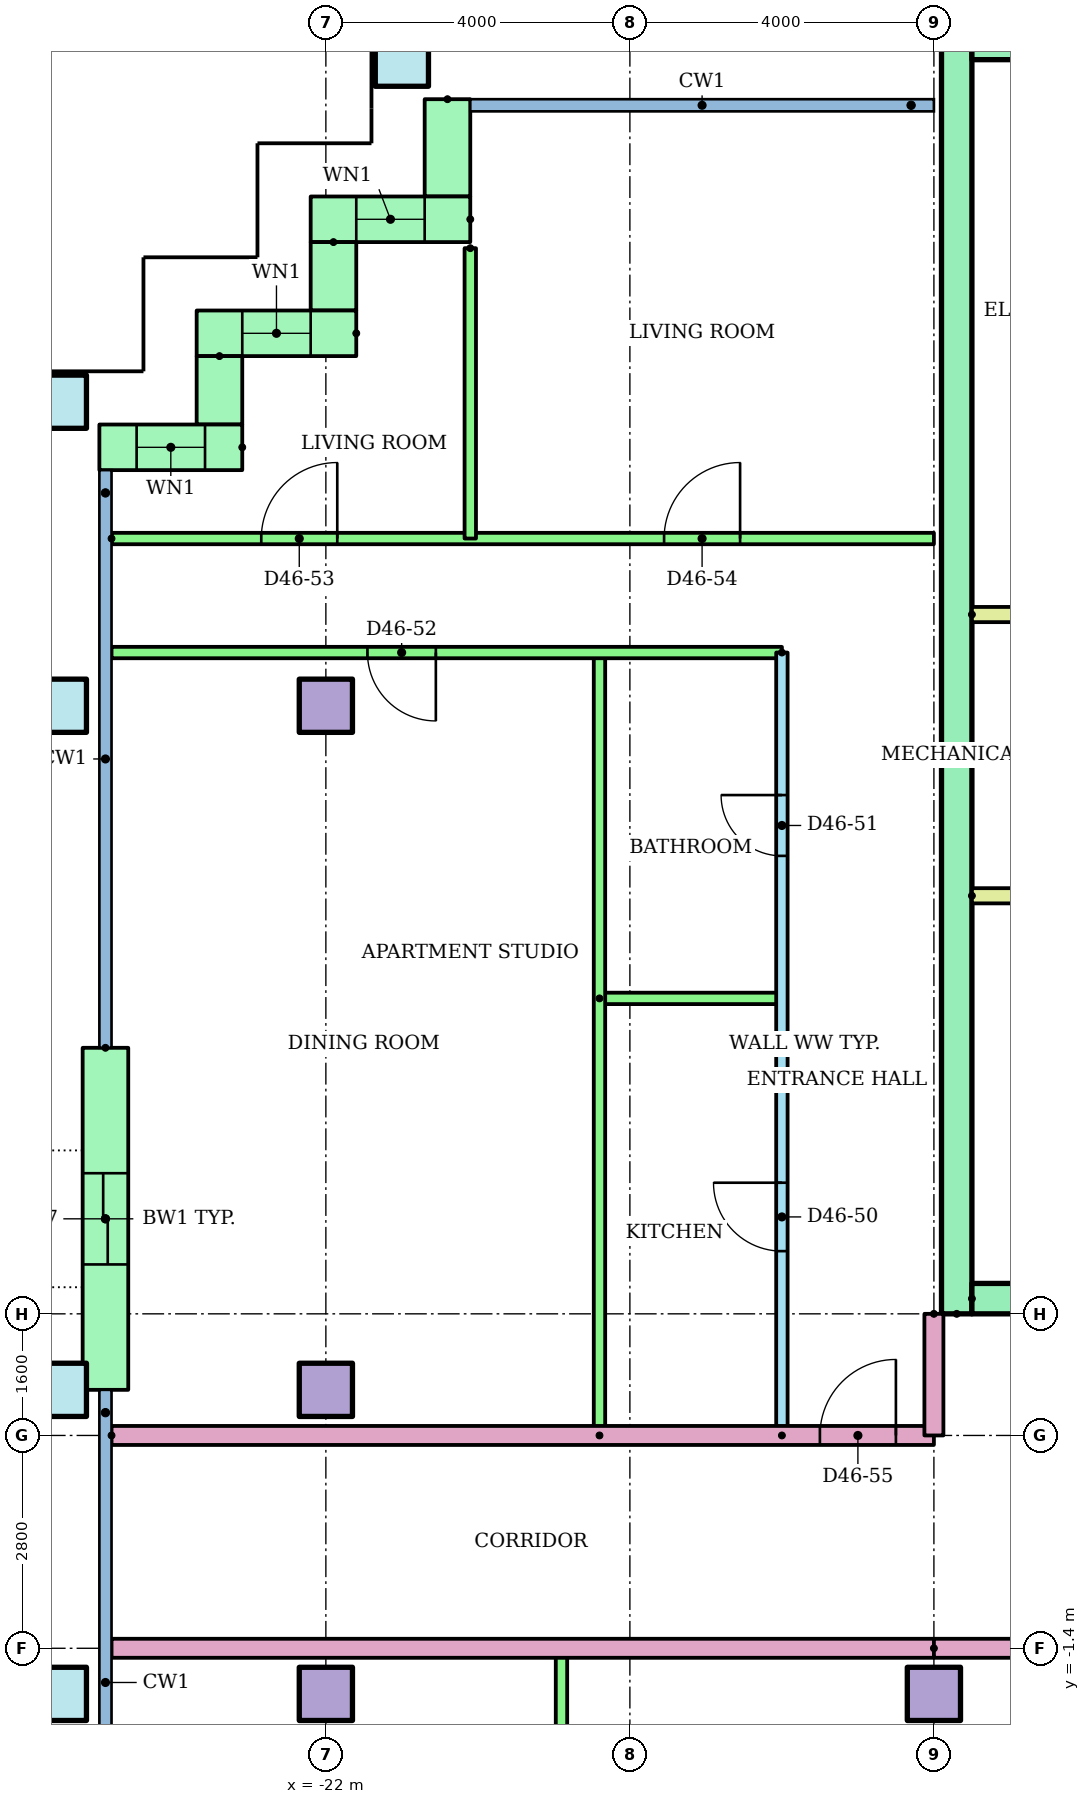
"""IFC4 building model, lengths in metres.
Left out: names, types, materials, properties, quantities, classifications, styles, units other than length and angle.
Written with IfcOpenShell. Run it as: python <this file> out.ifc"""

import sys

from ifc_helpers import new_model, si_unit, direction, frame, frame_2d, origin, origin_2d, place, context, subcontext, project, spatial, rectangle, hollow_rectangle, extrude, element, fill, save


model = new_model("IFC4")
c1 = context("Model", 3, precision=1e-05, world=origin(), true_north=direction((0.0, 1.0)))
c2 = subcontext(c1, "Body", "Model", "MODEL_VIEW")
j1 = project(units=[si_unit("LENGTHUNIT", "METRE"), si_unit("PLANEANGLEUNIT", "RADIAN")], contexts=[c1])
p1 = place(None, origin())
s1 = spatial("IfcSite", under=j1, at=p1, CompositionType="ELEMENT")
p2 = place(p1, origin())
s2 = spatial("IfcBuilding", under=s1, at=p2, CompositionType="ELEMENT")
p3 = place(p2, frame((0.0, 0.0, 178.1)))
s3 = spatial("IfcBuildingStorey", under=s2, at=p3, CompositionType="ELEMENT", Elevation=178.1)
p4 = place(p3, frame((-25.5, -2.0, 0.0)))
e1 = element("IfcColumn", 1, at=p4, inside=s3, PredefinedType="COLUMN", context=c2, shape_type="SweptSolid", body=[
    extrude(hollow_rectangle(XDim=0.7, YDim=0.7, WallThickness=0.036, at=origin_2d()), origin(), (0.0, 0.0, 1.0), 3.2),
])
for number, where in (
    (2, (-22.0, -2.0, 0.0)),
    (3, (-14.0, -2.0, 0.0)),
):
    element("IfcColumn", number, at=place(p3, frame(where)), inside=s3, PredefinedType="COLUMN", context=c2, shape_type="SweptSolid", body=[
        extrude(rectangle(XDim=0.7, YDim=0.7, at=origin_2d()), origin(), (0.0, 0.0, 1.0), 3.2),
    ])
p5 = place(p3, frame((-25.5, 2.0, 0.0)))
e4 = element("IfcColumn", 4, at=p5, inside=s3, PredefinedType="COLUMN", context=c2, shape_type="SweptSolid", body=[
    extrude(hollow_rectangle(XDim=0.7, YDim=0.7, WallThickness=0.036, at=origin_2d()), origin(), (0.0, 0.0, 1.0), 3.2),
])
p6 = place(p3, frame((-22.0, 2.0, 0.0)))
e5 = element("IfcColumn", 5, at=p6, inside=s3, PredefinedType="COLUMN", context=c2, shape_type="SweptSolid", body=[
    extrude(rectangle(XDim=0.7, YDim=0.7, at=origin_2d()), origin(), (0.0, 0.0, 1.0), 3.2),
])
p7 = place(p3, frame((-25.5, 11.0, 0.0)))
e6 = element("IfcColumn", 6, at=p7, inside=s3, PredefinedType="COLUMN", context=c2, shape_type="SweptSolid", body=[
    extrude(hollow_rectangle(XDim=0.7, YDim=0.7, WallThickness=0.036, at=origin_2d()), origin(), (0.0, 0.0, 1.0), 3.2),
])
p8 = place(p3, frame((-22.0, 11.0, 0.0)))
e7 = element("IfcColumn", 7, at=p8, inside=s3, PredefinedType="COLUMN", context=c2, shape_type="SweptSolid", body=[
    extrude(rectangle(XDim=0.7, YDim=0.7, at=origin_2d()), origin(), (0.0, 0.0, 1.0), 3.2),
])
for number, where in (
    (8, (-25.5, 15.0, 0.0)),
    (9, (-21.0, 19.5, 0.0)),
):
    element("IfcColumn", number, at=place(p3, frame(where)), inside=s3, PredefinedType="COLUMN", context=c2, shape_type="SweptSolid", body=[
        extrude(hollow_rectangle(XDim=0.7, YDim=0.7, WallThickness=0.036, at=origin_2d()), origin(), (0.0, 0.0, 1.0), 3.2),
    ])
p9 = place(p3, frame((-20.4, 18.98, 0.0), z_axis=(0.0, 0.0, 1.0), x_axis=(0.0, -1.0, 0.0)))
e10 = element("IfcWall", 10, at=p9, inside=s3, PredefinedType="STANDARD", context=c2, shape_type="SweptSolid", body=[
    extrude(rectangle(XDim=1.28, YDim=0.6, at=frame_2d((0.64, 0.0))), origin(), (0.0, 0.0, 1.0), 2.92),
])
p10 = place(p3, frame((-20.1, 17.4, 0.0), z_axis=(0.0, 0.0, 1.0), x_axis=(-1.0, 0.0, 0.0)))
e11 = element("IfcWall", 11, at=p10, inside=s3, PredefinedType="STANDARD", context=c2, shape_type="SweptSolid", body=[
    extrude(rectangle(XDim=2.1, YDim=0.6, at=frame_2d((1.05, 0.0))), origin(), (0.0, 0.0, 1.0), 2.92),
])
p11 = place(p10, frame((0.6, 0.0, 0.9)))
e12 = element("IfcOpeningElement", 12, at=p11, cuts=e11, PredefinedType="OPENING", context=c2, shape_type="SweptSolid", body=[
    extrude(rectangle(XDim=0.9, YDim=1.5, at=frame_2d((0.45, 0.75))), frame((0.0, 0.31, 0.0), z_axis=(0.0, -1.0, 0.0), x_axis=(1.0, 0.0, 0.0)), (0.0, 0.0, 1.0), 0.62),
])
p12 = place(p3, frame((-21.9, 17.1, 0.0), z_axis=(0.0, 0.0, 1.0), x_axis=(0.0, -1.0, 0.0)))
e13 = element("IfcWall", 13, at=p12, inside=s3, PredefinedType="STANDARD", context=c2, shape_type="SweptSolid", body=[
    extrude(rectangle(XDim=0.9, YDim=0.6, at=frame_2d((0.45, 0.0))), origin(), (0.0, 0.0, 1.0), 2.92),
])
p13 = place(p3, frame((-21.6, 15.9, 0.0), z_axis=(0.0, 0.0, 1.0), x_axis=(-1.0, 0.0, 0.0)))
e14 = element("IfcWall", 14, at=p13, inside=s3, PredefinedType="STANDARD", context=c2, shape_type="SweptSolid", body=[
    extrude(rectangle(XDim=2.1, YDim=0.6, at=frame_2d((1.05, 0.0))), origin(), (0.0, 0.0, 1.0), 2.92),
])
p14 = place(p13, frame((0.6, 0.0, 0.9)))
e15 = element("IfcOpeningElement", 15, at=p14, cuts=e14, PredefinedType="OPENING", context=c2, shape_type="SweptSolid", body=[
    extrude(rectangle(XDim=0.9, YDim=1.5, at=frame_2d((0.45, 0.75))), frame((0.0, 0.31, 0.0), z_axis=(0.0, -1.0, 0.0), x_axis=(1.0, 0.0, 0.0)), (0.0, 0.0, 1.0), 0.62),
])
p15 = place(p3, frame((-23.4, 15.6, 0.0), z_axis=(0.0, 0.0, 1.0), x_axis=(0.0, -1.0, 0.0)))
e16 = element("IfcWall", 16, at=p15, inside=s3, PredefinedType="STANDARD", context=c2, shape_type="SweptSolid", body=[
    extrude(rectangle(XDim=0.9, YDim=0.6, at=frame_2d((0.45, 0.0))), origin(), (0.0, 0.0, 1.0), 2.92),
])
p16 = place(p3, frame((-23.1, 14.4, 0.0), z_axis=(0.0, 0.0, 1.0), x_axis=(-1.0, 0.0, 0.0)))
e17 = element("IfcWall", 17, at=p16, inside=s3, PredefinedType="STANDARD", context=c2, shape_type="SweptSolid", body=[
    extrude(rectangle(XDim=1.88, YDim=0.6, at=frame_2d((0.94, 0.0))), origin(), (0.0, 0.0, 1.0), 2.92),
])
p17 = place(p16, frame((0.49, 0.0, 0.9)))
e18 = element("IfcOpeningElement", 18, at=p17, cuts=e17, PredefinedType="OPENING", context=c2, shape_type="SweptSolid", body=[
    extrude(rectangle(XDim=0.9, YDim=1.5, at=frame_2d((0.45, 0.75))), frame((0.0, 0.31, 0.0), z_axis=(0.0, -1.0, 0.0), x_axis=(1.0, 0.0, 0.0)), (0.0, 0.0, 1.0), 0.62),
])
p18 = place(p3, frame((-24.9, 6.5, 0.0), z_axis=(0.0, 0.0, 1.0), x_axis=(0.0, -1.0, 0.0)))
e19 = element("IfcWall", 19, at=p18, inside=s3, PredefinedType="STANDARD", context=c2, shape_type="SweptSolid", body=[
    extrude(rectangle(XDim=4.5, YDim=0.6, at=frame_2d((2.25, 0.0))), origin(), (0.0, 0.0, 1.0), 2.92),
])
p19 = place(p18, frame((1.65, 0.0, 0.0)))
e20 = element("IfcOpeningElement", 20, at=p19, cuts=e19, PredefinedType="OPENING", context=c2, shape_type="SweptSolid", body=[
    extrude(rectangle(XDim=1.2, YDim=2.1, at=frame_2d((0.6, 1.05))), frame((0.0, 0.31, 0.0), z_axis=(0.0, -1.0, 0.0), x_axis=(1.0, 0.0, 0.0)), (0.0, 0.0, 1.0), 0.62),
])
p20 = place(p3, frame((-13.7, 3.0, 0.0), z_axis=(0.0, 0.0, 1.0), x_axis=(0.0, 1.0, 0.0)))
e21 = element("IfcWall", 21, at=p20, inside=s3, PredefinedType="SHEAR", context=c2, shape_type="SweptSolid", body=[
    extrude(rectangle(XDim=17.0, YDim=0.4, at=frame_2d((8.5, 0.0))), origin(), (0.0, 0.0, 1.0), 2.92),
])
p21 = place(p3, frame((-13.5, 19.7, 0.0)))
e22 = element("IfcWall", 22, at=p21, inside=s3, PredefinedType="SHEAR", context=c2, shape_type="SweptSolid", body=[
    extrude(rectangle(XDim=27.0, YDim=0.4, at=frame_2d((13.5, 0.0))), origin(), (0.0, 0.0, 1.0), 2.92),
])
p22 = place(p3, frame((-13.5, 3.2, 0.0)))
e23 = element("IfcWall", 23, at=p22, inside=s3, PredefinedType="SHEAR", context=c2, shape_type="SweptSolid", body=[
    extrude(rectangle(XDim=27.0, YDim=0.4, at=frame_2d((13.5, 0.0))), origin(), (0.0, 0.0, 1.0), 2.92),
])
p23 = place(p22, frame((22.083, 0.0, 0.0)))
e24 = element("IfcOpeningElement", 24, at=p23, cuts=e23, PredefinedType="OPENING", context=c2, shape_type="SweptSolid", body=[
    extrude(rectangle(XDim=1.1, YDim=2.1, at=frame_2d((0.55, 1.05))), frame((0.0, 0.21, 0.0), z_axis=(0.0, -1.0, 0.0), x_axis=(1.0, 0.0, 0.0)), (0.0, 0.0, 1.0), 0.42),
])
p24 = place(p22, frame((25.128, 0.0, 0.0)))
e25 = element("IfcOpeningElement", 25, at=p24, cuts=e23, PredefinedType="OPENING", context=c2, shape_type="SweptSolid", body=[
    extrude(rectangle(XDim=1.1, YDim=2.1, at=frame_2d((0.55, 1.05))), frame((0.0, 0.21, 0.0), z_axis=(0.0, -1.0, 0.0), x_axis=(1.0, 0.0, 0.0)), (0.0, 0.0, 1.0), 0.42),
])
p25 = place(p22, frame((12.6, 0.0, 0.0)))
e26 = element("IfcOpeningElement", 26, at=p25, cuts=e23, PredefinedType="OPENING", context=c2, shape_type="SweptSolid", body=[
    extrude(rectangle(XDim=1.8, YDim=2.1, at=frame_2d((0.9, 1.05))), frame((0.0, 0.21, 0.0), z_axis=(0.0, -1.0, 0.0), x_axis=(1.0, 0.0, 0.0)), (0.0, 0.0, 1.0), 0.42),
])
for number, where in (
    (27, (-13.5, 8.5, 0.0)),
    (28, (-13.5, 12.2, 0.0)),
):
    element("IfcWall", number, at=place(p3, frame(where)), inside=s3, PredefinedType="PARTITIONING", context=c2, shape_type="SweptSolid", body=[
        extrude(rectangle(XDim=3.9, YDim=0.2, at=frame_2d((1.95, 0.0))), origin(), (0.0, 0.0, 1.0), 2.92),
    ])
p26 = place(p3, frame((-18.9, -9.3, 0.0), z_axis=(0.0, 0.0, 1.0), x_axis=(0.0, 1.0, 0.0)))
e29 = element("IfcWall", 29, at=p26, inside=s3, PredefinedType="PARTITIONING", context=c2, shape_type="SweptSolid", body=[
    extrude(rectangle(XDim=7.9, YDim=0.15, at=frame_2d((3.95, 0.0))), origin(), (0.0, 0.0, 1.0), 2.4),
])
p27 = place(p3, frame((-14.0, -1.4, 0.0), z_axis=(0.0, 0.0, 1.0), x_axis=(-1.0, 0.0, 0.0)))
e30 = element("IfcWall", 30, at=p27, inside=s3, PredefinedType="PARTITIONING", context=c2, shape_type="SweptSolid", body=[
    extrude(rectangle(XDim=10.82, YDim=0.25, at=frame_2d((5.41, 0.0))), origin(), (0.0, 0.0, 1.0), 2.4),
])
p28 = place(p3, frame((-16.0, 1.4, 0.0), z_axis=(0.0, 0.0, 1.0), x_axis=(0.0, 1.0, 0.0)))
e31 = element("IfcWall", 31, at=p28, inside=s3, PredefinedType="PARTITIONING", context=c2, shape_type="SweptSolid", body=[
    extrude(rectangle(XDim=10.3, YDim=0.15, at=frame_2d((5.15, 0.0))), origin(), (0.0, 0.0, 1.0), 2.4),
])
p29 = place(p28, frame((2.425, 0.0, 0.0)))
e32 = element("IfcOpeningElement", 32, at=p29, cuts=e31, PredefinedType="OPENING", context=c2, shape_type="SweptSolid", body=[
    extrude(rectangle(XDim=0.9, YDim=2.1, at=frame_2d((0.45, 1.05))), frame((0.0, 0.085, 0.0), z_axis=(0.0, -1.0, 0.0), x_axis=(1.0, 0.0, 0.0)), (0.0, 0.0, 1.0), 0.17),
])
p30 = place(p28, frame((7.625, 0.0, 0.0)))
e33 = element("IfcOpeningElement", 33, at=p30, cuts=e31, PredefinedType="OPENING", context=c2, shape_type="SweptSolid", body=[
    extrude(rectangle(XDim=0.8, YDim=2.1, at=frame_2d((0.4, 1.05))), frame((0.0, 0.085, 0.0), z_axis=(0.0, -1.0, 0.0), x_axis=(1.0, 0.0, 0.0)), (0.0, 0.0, 1.0), 0.17),
])
p31 = place(p3, frame((-18.4, 7.15, 0.0)))
e34 = element("IfcWall", 34, at=p31, inside=s3, PredefinedType="PARTITIONING", context=c2, shape_type="SweptSolid", body=[
    extrude(rectangle(XDim=2.4, YDim=0.15, at=frame_2d((1.2, 0.0))), origin(), (0.0, 0.0, 1.0), 2.4),
])
p32 = place(p3, frame((-18.4, 1.4, 0.0), z_axis=(0.0, 0.0, 1.0), x_axis=(0.0, 1.0, 0.0)))
e35 = element("IfcWall", 35, at=p32, inside=s3, PredefinedType="PARTITIONING", context=c2, shape_type="SweptSolid", body=[
    extrude(rectangle(XDim=10.3, YDim=0.15, at=frame_2d((5.15, 0.0))), origin(), (0.0, 0.0, 1.0), 2.4),
])
p33 = place(p3, frame((-16.0, 11.7, 0.0), z_axis=(0.0, 0.0, 1.0), x_axis=(-1.0, 0.0, 0.0)))
e36 = element("IfcWall", 36, at=p33, inside=s3, PredefinedType="PARTITIONING", context=c2, shape_type="SweptSolid", body=[
    extrude(rectangle(XDim=8.82, YDim=0.15, at=frame_2d((4.41, 0.0))), origin(), (0.0, 0.0, 1.0), 2.4),
])
p34 = place(p33, frame((4.553, 0.0, 0.0)))
e37 = element("IfcOpeningElement", 37, at=p34, cuts=e36, PredefinedType="OPENING", context=c2, shape_type="SweptSolid", body=[
    extrude(rectangle(XDim=0.9, YDim=2.1, at=frame_2d((0.45, 1.05))), frame((0.0, 0.085, 0.0), z_axis=(0.0, -1.0, 0.0), x_axis=(1.0, 0.0, 0.0)), (0.0, 0.0, 1.0), 0.17),
])
p35 = place(p3, frame((-24.82, 13.2, 0.0)))
e38 = element("IfcWall", 38, at=p35, inside=s3, PredefinedType="PARTITIONING", context=c2, shape_type="SweptSolid", body=[
    extrude(rectangle(XDim=10.82, YDim=0.15, at=frame_2d((5.41, 0.0))), origin(), (0.0, 0.0, 1.0), 2.4),
])
p36 = place(p35, frame((1.97, 0.0, 0.0)))
e39 = element("IfcOpeningElement", 39, at=p36, cuts=e38, PredefinedType="OPENING", context=c2, shape_type="SweptSolid", body=[
    extrude(rectangle(XDim=1.0, YDim=2.1, at=frame_2d((0.5, 1.05))), frame((0.0, 0.085, 0.0), z_axis=(0.0, -1.0, 0.0), x_axis=(1.0, 0.0, 0.0)), (0.0, 0.0, 1.0), 0.17),
])
p37 = place(p35, frame((7.27, 0.0, 0.0)))
e40 = element("IfcOpeningElement", 40, at=p37, cuts=e38, PredefinedType="OPENING", context=c2, shape_type="SweptSolid", body=[
    extrude(rectangle(XDim=1.0, YDim=2.1, at=frame_2d((0.5, 1.05))), frame((0.0, 0.085, 0.0), z_axis=(0.0, -1.0, 0.0), x_axis=(1.0, 0.0, 0.0)), (0.0, 0.0, 1.0), 0.17),
])
p38 = place(p3, frame((-20.1, 17.02, 0.0), z_axis=(0.0, 0.0, 1.0), x_axis=(0.0, -1.0, 0.0)))
e41 = element("IfcWall", 41, at=p38, inside=s3, PredefinedType="PARTITIONING", context=c2, shape_type="SweptSolid", body=[
    extrude(rectangle(XDim=3.82, YDim=0.15, at=frame_2d((1.91, 0.0))), origin(), (0.0, 0.0, 1.0), 2.4),
])
p39 = place(p3, frame((-24.82, 1.4, 0.0)))
e42 = element("IfcWall", 42, at=p39, inside=s3, PredefinedType="PARTITIONING", context=c2, shape_type="SweptSolid", body=[
    extrude(rectangle(XDim=10.82, YDim=0.25, at=frame_2d((5.41, 0.0))), origin(), (0.0, 0.0, 1.0), 2.4),
])
p40 = place(p39, frame((9.32, 0.0, 0.0)))
e43 = element("IfcOpeningElement", 43, at=p40, cuts=e42, PredefinedType="OPENING", context=c2, shape_type="SweptSolid", body=[
    extrude(rectangle(XDim=1.0, YDim=2.1, at=frame_2d((0.5, 1.05))), frame((0.0, 0.135, 0.0), z_axis=(0.0, -1.0, 0.0), x_axis=(1.0, 0.0, 0.0)), (0.0, 0.0, 1.0), 0.27),
])
p41 = place(p3, frame((14.0, -1.4, 0.0), z_axis=(0.0, 0.0, 1.0), x_axis=(-1.0, 0.0, 0.0)))
e44 = element("IfcWall", 44, at=p41, inside=s3, PredefinedType="PARTITIONING", context=c2, shape_type="SweptSolid", body=[
    extrude(rectangle(XDim=28.0, YDim=0.25, at=frame_2d((14.0, 0.0))), origin(), (0.0, 0.0, 1.0), 2.4),
])
p42 = place(p41, frame((12.547, 0.0, 0.0)))
e45 = element("IfcOpeningElement", 45, at=p42, cuts=e44, PredefinedType="OPENING", context=c2, shape_type="SweptSolid", body=[
    extrude(rectangle(XDim=1.0, YDim=2.1, at=frame_2d((0.5, 1.05))), frame((0.0, 0.135, 0.0), z_axis=(0.0, -1.0, 0.0), x_axis=(1.0, 0.0, 0.0)), (0.0, 0.0, 1.0), 0.27),
])
p43 = place(p41, frame((10.453, 0.0, 0.0)))
e46 = element("IfcOpeningElement", 46, at=p43, cuts=e44, PredefinedType="OPENING", context=c2, shape_type="SweptSolid", body=[
    extrude(rectangle(XDim=1.0, YDim=2.1, at=frame_2d((0.5, 1.05))), frame((0.0, 0.135, 0.0), z_axis=(0.0, -1.0, 0.0), x_axis=(1.0, 0.0, 0.0)), (0.0, 0.0, 1.0), 0.27),
])
p44 = place(p3, frame((-14.0, 3.0, 0.0), z_axis=(0.0, 0.0, 1.0), x_axis=(0.0, -1.0, 0.0)))
e47 = element("IfcWall", 47, at=p44, inside=s3, PredefinedType="PARTITIONING", context=c2, shape_type="SweptSolid", body=[
    extrude(rectangle(XDim=1.6, YDim=0.25, at=frame_2d((0.8, 0.0))), origin(), (0.0, 0.0, 1.0), 2.4),
])
p45 = place(p11, origin())
e48 = element("IfcWindow", 48, at=p45, inside=s3, PartitioningType="SINGLE_PANEL", PredefinedType="WINDOW", context=c2, shape_type="SweptSolid", body=[
    extrude(rectangle(XDim=0.9, YDim=1.5, at=frame_2d((0.45, 0.75))), frame((0.0, 0.03, 0.0), z_axis=(0.0, -1.0, 0.0), x_axis=(1.0, 0.0, 0.0)), (0.0, 0.0, 1.0), 0.06),
])
fill(e12, e48)
p46 = place(p14, origin())
e49 = element("IfcWindow", 49, at=p46, inside=s3, PartitioningType="SINGLE_PANEL", PredefinedType="WINDOW", context=c2, shape_type="SweptSolid", body=[
    extrude(rectangle(XDim=0.9, YDim=1.5, at=frame_2d((0.45, 0.75))), frame((0.0, 0.03, 0.0), z_axis=(0.0, -1.0, 0.0), x_axis=(1.0, 0.0, 0.0)), (0.0, 0.0, 1.0), 0.06),
])
fill(e15, e49)
p47 = place(p17, origin())
e50 = element("IfcWindow", 50, at=p47, inside=s3, PartitioningType="SINGLE_PANEL", PredefinedType="WINDOW", context=c2, shape_type="SweptSolid", body=[
    extrude(rectangle(XDim=0.9, YDim=1.5, at=frame_2d((0.45, 0.75))), frame((0.0, 0.03, 0.0), z_axis=(0.0, -1.0, 0.0), x_axis=(1.0, 0.0, 0.0)), (0.0, 0.0, 1.0), 0.06),
])
fill(e18, e50)
p48 = place(p29, origin())
e51 = element("IfcDoor", 51, at=p48, inside=s3, OperationType="SINGLE_SWING_RIGHT", PredefinedType="DOOR", context=c2, shape_type="SweptSolid", body=[
    extrude(rectangle(XDim=0.9, YDim=2.1, at=frame_2d((0.45, 1.05))), frame((0.0, 0.025, 0.0), z_axis=(0.0, -1.0, 0.0), x_axis=(1.0, 0.0, 0.0)), (0.0, 0.0, 1.0), 0.05),
])
fill(e32, e51)
p49 = place(p30, origin())
e52 = element("IfcDoor", 52, at=p49, inside=s3, OperationType="SINGLE_SWING_RIGHT", PredefinedType="DOOR", context=c2, shape_type="SweptSolid", body=[
    extrude(rectangle(XDim=0.8, YDim=2.1, at=frame_2d((0.4, 1.05))), frame((0.0, 0.025, 0.0), z_axis=(0.0, -1.0, 0.0), x_axis=(1.0, 0.0, 0.0)), (0.0, 0.0, 1.0), 0.05),
])
fill(e33, e52)
p50 = place(p34, origin())
e53 = element("IfcDoor", 53, at=p50, inside=s3, OperationType="SINGLE_SWING_LEFT", PredefinedType="DOOR", context=c2, shape_type="SweptSolid", body=[
    extrude(rectangle(XDim=0.9, YDim=2.1, at=frame_2d((0.45, 1.05))), frame((0.0, 0.025, 0.0), z_axis=(0.0, -1.0, 0.0), x_axis=(1.0, 0.0, 0.0)), (0.0, 0.0, 1.0), 0.05),
])
fill(e37, e53)
p51 = place(p36, origin())
e54 = element("IfcDoor", 54, at=p51, inside=s3, OperationType="SINGLE_SWING_RIGHT", PredefinedType="DOOR", context=c2, shape_type="SweptSolid", body=[
    extrude(rectangle(XDim=1.0, YDim=2.1, at=frame_2d((0.5, 1.05))), frame((0.0, 0.025, 0.0), z_axis=(0.0, -1.0, 0.0), x_axis=(1.0, 0.0, 0.0)), (0.0, 0.0, 1.0), 0.05),
])
fill(e39, e54)
p52 = place(p37, origin())
e55 = element("IfcDoor", 55, at=p52, inside=s3, OperationType="SINGLE_SWING_RIGHT", PredefinedType="DOOR", context=c2, shape_type="SweptSolid", body=[
    extrude(rectangle(XDim=1.0, YDim=2.1, at=frame_2d((0.5, 1.05))), frame((0.0, 0.025, 0.0), z_axis=(0.0, -1.0, 0.0), x_axis=(1.0, 0.0, 0.0)), (0.0, 0.0, 1.0), 0.05),
])
fill(e40, e55)
p53 = place(p40, origin())
e56 = element("IfcDoor", 56, at=p53, inside=s3, OperationType="SINGLE_SWING_RIGHT", PredefinedType="DOOR", context=c2, shape_type="SweptSolid", body=[
    extrude(rectangle(XDim=1.0, YDim=2.1, at=frame_2d((0.5, 1.05))), frame((0.0, 0.025, 0.0), z_axis=(0.0, -1.0, 0.0), x_axis=(1.0, 0.0, 0.0)), (0.0, 0.0, 1.0), 0.05),
])
fill(e43, e56)
p54 = place(p19, origin())
e57 = element("IfcDoor", 57, at=p54, inside=s3, OperationType="SLIDING_TO_LEFT", PredefinedType="DOOR", context=c2, shape_type="SweptSolid", body=[
    extrude(rectangle(XDim=1.2, YDim=2.1, at=frame_2d((0.6, 1.05))), frame((0.0, 0.025, 0.0), z_axis=(0.0, -1.0, 0.0), x_axis=(1.0, 0.0, 0.0)), (0.0, 0.0, 1.0), 0.05),
])
fill(e20, e57)
save(model, sys.argv[1])
